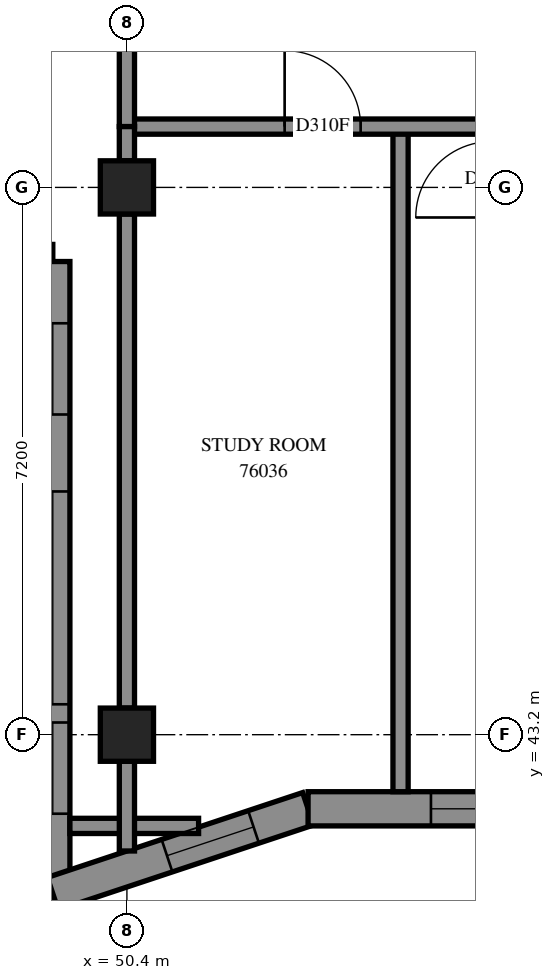
"""IFC4 building model, lengths in metres.
Left out: names, types, materials, properties, quantities, classifications, styles, units other than length and angle.
Written with IfcOpenShell. Run it as: python <this file> out.ifc"""

import sys

from ifc_helpers import new_model, si_unit, direction, frame, frame_2d, origin, origin_2d, place, context, subcontext, project, spatial, polyline, rectangle, outline, extrude, element, fill, save


model = new_model("IFC4")
c1 = context("Model", 3, precision=1e-05, world=origin(), true_north=direction((0.0, 1.0)))
c2 = subcontext(c1, "Body", "Model", "MODEL_VIEW")
j1 = project(units=[si_unit("LENGTHUNIT", "METRE"), si_unit("PLANEANGLEUNIT", "RADIAN")], contexts=[c1])
p1 = place(None, origin())
s1 = spatial("IfcSite", under=j1, at=p1, CompositionType="ELEMENT")
p2 = place(p1, origin())
s2 = spatial("IfcBuilding", under=s1, at=p2, CompositionType="ELEMENT")
p3 = place(p2, frame((0.0, 0.0, 277.8)))
s3 = spatial("IfcBuildingStorey", under=s2, at=p3, CompositionType="ELEMENT", Elevation=277.8)
for number, where, z_axis, x_axis in (
    (1, (50.4, 43.2, 0.0), (0.0, 0.0, 1.0), (1.0, 0.0, 0.0)),
    (2, (50.4, 50.4, 0.0), (0.0, 0.0, 1.0), (1.0, 0.0, 0.0)),
):
    element("IfcColumn", number, at=place(p3, frame(where, z_axis=z_axis, x_axis=x_axis)), inside=s3, PredefinedType="COLUMN", context=c2, shape_type="SweptSolid", body=[
        extrude(rectangle(XDim=0.7, YDim=0.7, at=origin_2d()), origin(), (0.0, 0.0, 1.0), 3.1),
    ])
p4 = place(p3, frame((42.225, 49.425, 0.0), z_axis=(0.0, 0.0, 1.0), x_axis=(1.0, 0.0, 0.0)))
e3 = element("IfcWall", 3, at=p4, inside=s3, PredefinedType="SOLIDWALL", context=c2, shape_type="SweptSolid", body=[
    extrude(outline(polyline([(-0.225, -0.225), (6.975, -0.225), (7.425, 0.225), (0.225, 0.225), (-0.225, -0.225)])), origin(), (0.0, 0.0, 1.0), 3.1),
])
p5 = place(p4, frame((1.375, 0.0, 0.45)))
e4 = element("IfcOpeningElement", 4, at=p5, cuts=e3, PredefinedType="OPENING", context=c2, shape_type="SweptSolid", body=[
    extrude(rectangle(XDim=2.8, YDim=2.55, at=frame_2d((1.4, 1.275))), frame((0.0, 0.235, 0.0), z_axis=(0.0, -1.0, 0.0), x_axis=(1.0, 0.0, 0.0)), (0.0, 0.0, 1.0), 0.47),
])
p6 = place(p4, frame((5.188, 0.0, 0.45)))
e5 = element("IfcOpeningElement", 5, at=p6, cuts=e3, PredefinedType="OPENING", context=c2, shape_type="SweptSolid", body=[
    extrude(rectangle(XDim=1.2, YDim=2.55, at=frame_2d((0.6, 1.275))), frame((0.0, 0.235, 0.0), z_axis=(0.0, -1.0, 0.0), x_axis=(1.0, 0.0, 0.0)), (0.0, 0.0, 1.0), 0.47),
])
p7 = place(p3, frame((49.425, 49.425, 0.0), z_axis=(0.0, 0.0, 1.0), x_axis=(0.0, -1.0, 0.0)))
e6 = element("IfcWall", 6, at=p7, inside=s3, PredefinedType="SOLIDWALL", context=c2, shape_type="SweptSolid", body=[
    extrude(outline(polyline([(0.225, -0.225), (8.628, -0.225), (8.004, 0.225), (-0.225, 0.225), (0.225, -0.225)])), origin(), (0.0, 0.0, 1.0), 3.1),
])
p8 = place(p7, frame((3.025, 0.0, 0.45)))
e7 = element("IfcOpeningElement", 7, at=p8, cuts=e6, PredefinedType="OPENING", context=c2, shape_type="SweptSolid", body=[
    extrude(rectangle(XDim=2.8, YDim=2.55, at=frame_2d((1.4, 1.275))), frame((0.0, 0.235, 0.0), z_axis=(0.0, -1.0, 0.0), x_axis=(1.0, 0.0, 0.0)), (0.0, 0.0, 1.0), 0.47),
])
p9 = place(p7, frame((0.812, 0.0, 0.45)))
e8 = element("IfcOpeningElement", 8, at=p9, cuts=e6, PredefinedType="OPENING", context=c2, shape_type="SweptSolid", body=[
    extrude(rectangle(XDim=1.2, YDim=2.55, at=frame_2d((0.6, 1.275))), frame((0.0, 0.235, 0.0), z_axis=(0.0, -1.0, 0.0), x_axis=(1.0, 0.0, 0.0)), (0.0, 0.0, 1.0), 0.47),
])
p10 = place(p7, frame((6.065, 0.0, 0.45)))
e9 = element("IfcOpeningElement", 9, at=p10, cuts=e6, PredefinedType="OPENING", context=c2, shape_type="SweptSolid", body=[
    extrude(rectangle(XDim=1.2, YDim=2.55, at=frame_2d((0.6, 1.275))), frame((0.0, 0.235, 0.0), z_axis=(0.0, -1.0, 0.0), x_axis=(1.0, 0.0, 0.0)), (0.0, 0.0, 1.0), 0.47),
])
p11 = place(p3, frame((49.425, 41.109, 0.0), z_axis=(0.0, 0.0, 1.0), x_axis=(0.9489711132, 0.3153630071, 0.0)))
e10 = element("IfcWall", 10, at=p11, inside=s3, PredefinedType="SOLIDWALL", context=c2, shape_type="SweptSolid", body=[
    extrude(outline(polyline([(-0.312, -0.225), (3.503, -0.225), (3.575, 0.225), (0.312, 0.225), (-0.312, -0.225)])), origin(), (0.0, 0.0, 1.0), 3.1),
])
p12 = place(p11, frame((1.583, 0.0, 0.45)))
e11 = element("IfcOpeningElement", 11, at=p12, cuts=e10, PredefinedType="OPENING", context=c2, shape_type="SweptSolid", body=[
    extrude(rectangle(XDim=1.2, YDim=2.55, at=frame_2d((0.6, 1.275))), frame((0.0, 0.235, 0.0), z_axis=(0.0, -1.0, 0.0), x_axis=(1.0, 0.0, 0.0)), (0.0, 0.0, 1.0), 0.47),
])
p13 = place(p3, frame((52.783, 42.225, 0.0), z_axis=(0.0, 0.0, 1.0), x_axis=(1.0, 0.0, 0.0)))
e12 = element("IfcWall", 12, at=p13, inside=s3, PredefinedType="SOLIDWALL", context=c2, shape_type="SweptSolid", body=[
    extrude(outline(polyline([(0.036, -0.225), (7.276, -0.225), (7.313, 0.225), (-0.036, 0.225), (0.036, -0.225)])), origin(), (0.0, 0.0, 1.0), 3.1),
])
p14 = place(p13, frame((1.617, 0.0, 0.45)))
e13 = element("IfcOpeningElement", 13, at=p14, cuts=e12, PredefinedType="OPENING", context=c2, shape_type="SweptSolid", body=[
    extrude(rectangle(XDim=2.8, YDim=2.55, at=frame_2d((1.4, 1.275))), frame((0.0, 0.235, 0.0), z_axis=(0.0, -1.0, 0.0), x_axis=(1.0, 0.0, 0.0)), (0.0, 0.0, 1.0), 0.47),
])
p15 = place(p13, frame((5.356, 0.0, 0.45)))
e14 = element("IfcOpeningElement", 14, at=p15, cuts=e12, PredefinedType="OPENING", context=c2, shape_type="SweptSolid", body=[
    extrude(rectangle(XDim=1.2, YDim=2.55, at=frame_2d((0.6, 1.275))), frame((0.0, 0.235, 0.0), z_axis=(0.0, -1.0, 0.0), x_axis=(1.0, 0.0, 0.0)), (0.0, 0.0, 1.0), 0.47),
])
p16 = place(p3, frame((54.0, 42.45, 0.0), z_axis=(0.0, 0.0, 1.0), x_axis=(0.0, 1.0, 0.0)))
e15 = element("IfcWall", 15, at=p16, inside=s3, PredefinedType="PARTITIONING", context=c2, shape_type="SweptSolid", body=[
    extrude(rectangle(XDim=8.75, YDim=0.2, at=frame_2d((4.375, 0.0))), origin(), (0.0, 0.0, 1.0), 3.1),
])
p17 = place(p3, frame((50.4, 43.55, 0.0), z_axis=(0.0, 0.0, 1.0), x_axis=(0.0, 1.0, 0.0)))
e16 = element("IfcWall", 16, at=p17, inside=s3, PredefinedType="PARTITIONING", context=c2, shape_type="SweptSolid", body=[
    extrude(rectangle(XDim=6.5, YDim=0.2, at=frame_2d((3.25, 0.0))), origin(), (0.0, 0.0, 1.0), 2.6),
])
p18 = place(p3, frame((50.4, 51.2, 0.0), z_axis=(0.0, 0.0, 1.0), x_axis=(1.0, 0.0, 0.0)))
e17 = element("IfcWall", 17, at=p18, inside=s3, PredefinedType="PARTITIONING", context=c2, shape_type="SweptSolid", body=[
    extrude(rectangle(XDim=4.8, YDim=0.2, at=frame_2d((2.4, 0.0))), origin(), (0.0, 0.0, 1.0), 3.1),
])
p19 = place(p18, frame((2.075, 0.0, 0.0)))
e18 = element("IfcOpeningElement", 18, at=p19, cuts=e17, PredefinedType="OPENING", context=c2, shape_type="SweptSolid", body=[
    extrude(rectangle(XDim=1.0, YDim=2.1, at=frame_2d((0.5, 1.05))), frame((0.0, 0.11, 0.0), z_axis=(0.0, -1.0, 0.0), x_axis=(1.0, 0.0, 0.0)), (0.0, 0.0, 1.0), 0.22),
])
p20 = place(p3, frame((50.4, 51.2, 0.0), z_axis=(0.0, 0.0, 1.0), x_axis=(0.0, 1.0, 0.0)))
e19 = element("IfcWall", 19, at=p20, inside=s3, PredefinedType="PARTITIONING", context=c2, shape_type="SweptSolid", body=[
    extrude(rectangle(XDim=2.0, YDim=0.2, at=frame_2d((1.0, 0.0))), origin(), (0.0, 0.0, 1.0), 3.1),
])
p21 = place(p3, frame((49.65, 42.0, 0.0), z_axis=(0.0, 0.0, 1.0), x_axis=(1.0, 0.0, 0.0)))
e20 = element("IfcWall", 20, at=p21, inside=s3, PredefinedType="PARTITIONING", context=c2, shape_type="SweptSolid", body=[
    extrude(rectangle(XDim=1.693, YDim=0.2, at=frame_2d((0.847, 0.0))), origin(), (0.0, 0.0, 1.0), 3.1),
])
p22 = place(p3, frame((50.4, 41.67, 0.0), z_axis=(0.0, 0.0, 1.0), x_axis=(0.0, 1.0, 0.0)))
e21 = element("IfcWall", 21, at=p22, inside=s3, PredefinedType="PARTITIONING", context=c2, shape_type="SweptSolid", body=[
    extrude(rectangle(XDim=1.18, YDim=0.2, at=frame_2d((0.59, 0.0))), origin(), (0.0, 0.0, 1.0), 3.1),
])
p23 = place(p3, frame((50.4, 50.75, 0.0), z_axis=(0.0, 0.0, 1.0), x_axis=(0.0, 1.0, 0.0)))
e22 = element("IfcWall", 22, at=p23, inside=s3, PredefinedType="PARTITIONING", context=c2, shape_type="SweptSolid", body=[
    extrude(rectangle(XDim=0.45, YDim=0.2, at=frame_2d((0.225, 0.0))), origin(), (0.0, 0.0, 1.0), 3.1),
])
p24 = place(p8, origin())
e23 = element("IfcWindow", 23, at=p24, inside=s3, PartitioningType="SINGLE_PANEL", PredefinedType="WINDOW", context=c2, shape_type="SweptSolid", body=[
    extrude(rectangle(XDim=2.8, YDim=2.55, at=frame_2d((1.4, 1.275))), frame((0.0, 0.205, 0.0), z_axis=(0.0, -1.0, 0.0), x_axis=(1.0, 0.0, 0.0)), (0.0, 0.0, 1.0), 0.06),
])
fill(e7, e23)
p25 = place(p9, origin())
e24 = element("IfcWindow", 24, at=p25, inside=s3, PartitioningType="SINGLE_PANEL", PredefinedType="WINDOW", context=c2, shape_type="SweptSolid", body=[
    extrude(rectangle(XDim=1.2, YDim=2.55, at=frame_2d((0.6, 1.275))), frame((0.0, 0.205, 0.0), z_axis=(0.0, -1.0, 0.0), x_axis=(1.0, 0.0, 0.0)), (0.0, 0.0, 1.0), 0.06),
])
fill(e8, e24)
p26 = place(p10, origin())
e25 = element("IfcWindow", 25, at=p26, inside=s3, PartitioningType="SINGLE_PANEL", PredefinedType="WINDOW", context=c2, shape_type="SweptSolid", body=[
    extrude(rectangle(XDim=1.2, YDim=2.55, at=frame_2d((0.6, 1.275))), frame((0.0, 0.205, 0.0), z_axis=(0.0, -1.0, 0.0), x_axis=(1.0, 0.0, 0.0)), (0.0, 0.0, 1.0), 0.06),
])
fill(e9, e25)
p27 = place(p12, origin())
e26 = element("IfcWindow", 26, at=p27, inside=s3, PartitioningType="SINGLE_PANEL", PredefinedType="WINDOW", context=c2, shape_type="SweptSolid", body=[
    extrude(rectangle(XDim=1.2, YDim=2.55, at=frame_2d((0.6, 1.275))), frame((0.0, 0.115, 0.0), z_axis=(0.0, -1.0, 0.0), x_axis=(1.0, 0.0, 0.0)), (0.0, 0.0, 1.0), 0.06),
])
fill(e11, e26)
p28 = place(p14, origin())
e27 = element("IfcWindow", 27, at=p28, inside=s3, PartitioningType="SINGLE_PANEL", PredefinedType="WINDOW", context=c2, shape_type="SweptSolid", body=[
    extrude(rectangle(XDim=2.8, YDim=2.55, at=frame_2d((1.4, 1.275))), frame((0.0, 0.205, 0.0), z_axis=(0.0, -1.0, 0.0), x_axis=(1.0, 0.0, 0.0)), (0.0, 0.0, 1.0), 0.06),
])
fill(e13, e27)
p29 = place(p19, origin())
e28 = element("IfcDoor", 28, at=p29, inside=s3, OperationType="SINGLE_SWING_LEFT", PredefinedType="DOOR", context=c2, shape_type="SweptSolid", body=[
    extrude(rectangle(XDim=1.0, YDim=2.1, at=frame_2d((0.5, 1.05))), frame((0.0, 0.025, 0.0), z_axis=(0.0, -1.0, 0.0), x_axis=(1.0, 0.0, 0.0)), (0.0, 0.0, 1.0), 0.05),
])
fill(e18, e28)
save(model, sys.argv[1])
